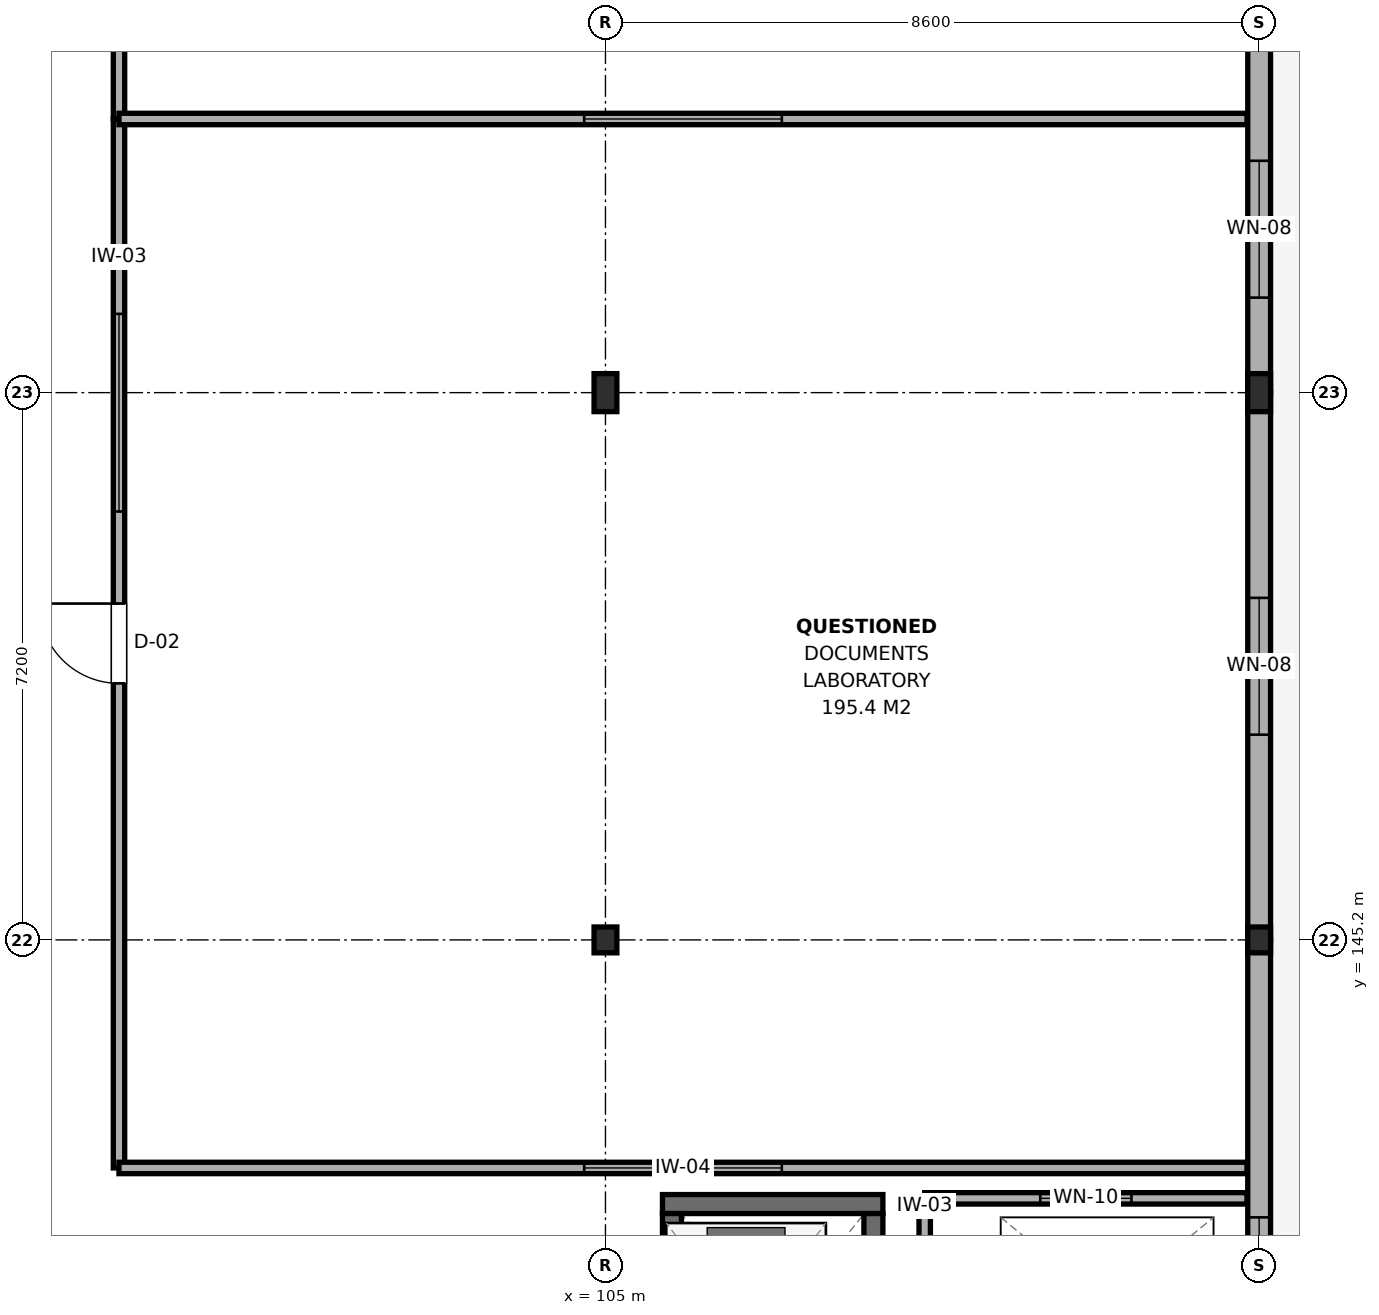
"""IFC4 building model, lengths in metres.
Left out: names, types, materials, properties, quantities, classifications, styles, units other than length and angle.
Written with IfcOpenShell. Run it as: python <this file> out.ifc"""

import sys

from ifc_helpers import new_model, si_unit, direction, frame, frame_2d, origin, origin_2d, place, context, subcontext, project, spatial, rectangle, i_section, extrude, element, fill, save


model = new_model("IFC4")
c1 = context("Model", 3, precision=1e-05, world=origin(), true_north=direction((0.0, 1.0)))
c2 = subcontext(c1, "Body", "Model", "MODEL_VIEW")
j1 = project(units=[si_unit("LENGTHUNIT", "METRE"), si_unit("PLANEANGLEUNIT", "RADIAN")], contexts=[c1])
p1 = place(None, origin())
s1 = spatial("IfcSite", under=j1, at=p1, CompositionType="ELEMENT")
p2 = place(p1, origin())
s2 = spatial("IfcBuilding", under=s1, at=p2, CompositionType="ELEMENT")
p3 = place(p2, frame((0.0, 0.0, 9.0)))
s3 = spatial("IfcBuildingStorey", under=s2, at=p3, CompositionType="ELEMENT", Elevation=9.0)
p4 = place(p3, frame((105.0, 145.2, 0.0), z_axis=(0.0, 0.0, 1.0), x_axis=(1.0, 0.0, 0.0)))
e1 = element("IfcColumn", 1, at=p4, inside=s3, PredefinedType="COLUMN", context=c2, shape_type="SweptSolid", body=[
    extrude(i_section(OverallWidth=0.3, OverallDepth=0.34, WebThickness=0.012, FlangeThickness=0.021, FilletRadius=0.027, at=origin_2d()), origin(), (0.0, 0.0, 1.0), 4.2),
])
p5 = place(p3, frame((105.0, 152.4, 0.0), z_axis=(0.0, 0.0, 1.0), x_axis=(1.0, 0.0, 0.0)))
e2 = element("IfcColumn", 2, at=p5, inside=s3, PredefinedType="COLUMN", context=c2, shape_type="SweptSolid", body=[
    extrude(i_section(OverallWidth=0.3, OverallDepth=0.5, WebThickness=0.014, FlangeThickness=0.028, FilletRadius=0.027, at=origin_2d()), origin(), (0.0, 0.0, 1.0), 4.2),
])
p6 = place(p3, frame((113.6, 145.2, 0.0), z_axis=(0.0, 0.0, 1.0), x_axis=(1.0, 0.0, 0.0)))
e3 = element("IfcColumn", 3, at=p6, inside=s3, PredefinedType="COLUMN", context=c2, shape_type="SweptSolid", body=[
    extrude(i_section(OverallWidth=0.3, OverallDepth=0.34, WebThickness=0.012, FlangeThickness=0.021, FilletRadius=0.027, at=origin_2d()), origin(), (0.0, 0.0, 1.0), 4.2),
])
p7 = place(p3, frame((113.6, 152.4, 0.0), z_axis=(0.0, 0.0, 1.0), x_axis=(1.0, 0.0, 0.0)))
e4 = element("IfcColumn", 4, at=p7, inside=s3, PredefinedType="COLUMN", context=c2, shape_type="SweptSolid", body=[
    extrude(i_section(OverallWidth=0.3, OverallDepth=0.5, WebThickness=0.014, FlangeThickness=0.028, FilletRadius=0.027, at=origin_2d()), origin(), (0.0, 0.0, 1.0), 4.2),
])
p8 = place(p3, frame((105.75, 141.725, 0.0), z_axis=(0.0, 0.0, 1.0), x_axis=(1.0, 0.0, 0.0)))
e5 = element("IfcWall", 5, at=p8, inside=s3, PredefinedType="SHEAR", context=c2, shape_type="SweptSolid", body=[
    extrude(rectangle(XDim=2.9, YDim=0.25, at=frame_2d((1.45, 0.0))), origin(), (0.0, 0.0, 1.0), 3.98),
])
p9 = place(p3, frame((105.875, 138.6, 0.0), z_axis=(0.0, 0.0, 1.0), x_axis=(0.0, 1.0, 0.0)))
e6 = element("IfcWall", 6, at=p9, inside=s3, PredefinedType="SHEAR", context=c2, shape_type="SweptSolid", body=[
    extrude(rectangle(XDim=3.0, YDim=0.25, at=frame_2d((1.5, 0.0))), origin(), (0.0, 0.0, 1.0), 3.98),
])
p10 = place(p9, frame((0.925, 0.0, 0.0)))
e7 = element("IfcOpeningElement", 7, at=p10, cuts=e6, PredefinedType="OPENING", context=c2, shape_type="SweptSolid", body=[
    extrude(rectangle(XDim=1.15, YDim=2.15, at=frame_2d((0.575, 1.075))), frame((0.0, 0.14, 0.0), z_axis=(0.0, -1.0, 0.0), x_axis=(1.0, 0.0, 0.0)), (0.0, 0.0, 1.0), 0.28),
])
p11 = place(p3, frame((108.525, 138.6, 0.0), z_axis=(0.0, 0.0, 1.0), x_axis=(0.0, 1.0, 0.0)))
e8 = element("IfcWall", 8, at=p11, inside=s3, PredefinedType="SHEAR", context=c2, shape_type="SweptSolid", body=[
    extrude(rectangle(XDim=3.0, YDim=0.25, at=frame_2d((1.5, 0.0))), origin(), (0.0, 0.0, 1.0), 3.98),
])
p12 = place(p3, frame((113.6, 138.0, 0.0), z_axis=(0.0, 0.0, 1.0), x_axis=(0.0, 1.0, 0.0)))
e9 = element("IfcWall", 9, at=p12, inside=s3, PredefinedType="SOLIDWALL", context=c2, shape_type="SweptSolid", body=[
    extrude(rectangle(XDim=7.2, YDim=0.3, at=frame_2d((3.6, 0.0))), origin(), (0.0, 0.0, 1.0), 3.375),
])
p13 = place(p12, frame((1.75, 0.0, 1.1)))
e10 = element("IfcOpeningElement", 10, at=p13, cuts=e9, PredefinedType="OPENING", context=c2, shape_type="SweptSolid", body=[
    extrude(rectangle(XDim=1.8, YDim=1.2, at=frame_2d((0.9, 0.6))), frame((0.0, 0.165, 0.0), z_axis=(0.0, -1.0, 0.0), x_axis=(1.0, 0.0, 0.0)), (0.0, 0.0, 1.0), 0.33),
])
p14 = place(p3, frame((113.6, 145.2, 0.0), z_axis=(0.0, 0.0, 1.0), x_axis=(0.0, 1.0, 0.0)))
e11 = element("IfcWall", 11, at=p14, inside=s3, PredefinedType="SOLIDWALL", context=c2, shape_type="SweptSolid", body=[
    extrude(rectangle(XDim=7.2, YDim=0.3, at=frame_2d((3.6, 0.0))), origin(), (0.0, 0.0, 1.0), 3.375),
])
p15 = place(p14, frame((2.7, 0.0, 1.1)))
e12 = element("IfcOpeningElement", 12, at=p15, cuts=e11, PredefinedType="OPENING", context=c2, shape_type="SweptSolid", body=[
    extrude(rectangle(XDim=1.8, YDim=1.2, at=frame_2d((0.9, 0.6))), frame((0.0, 0.165, 0.0), z_axis=(0.0, -1.0, 0.0), x_axis=(1.0, 0.0, 0.0)), (0.0, 0.0, 1.0), 0.33),
])
p16 = place(p3, frame((113.6, 152.4, 0.0), z_axis=(0.0, 0.0, 1.0), x_axis=(0.0, 1.0, 0.0)))
e13 = element("IfcWall", 13, at=p16, inside=s3, PredefinedType="SOLIDWALL", context=c2, shape_type="SweptSolid", body=[
    extrude(rectangle(XDim=7.2, YDim=0.3, at=frame_2d((3.6, 0.0))), origin(), (0.0, 0.0, 1.0), 3.375),
])
p17 = place(p16, frame((1.25, 0.0, 1.1)))
e14 = element("IfcOpeningElement", 14, at=p17, cuts=e13, PredefinedType="OPENING", context=c2, shape_type="SweptSolid", body=[
    extrude(rectangle(XDim=1.8, YDim=1.2, at=frame_2d((0.9, 0.6))), frame((0.0, 0.165, 0.0), z_axis=(0.0, -1.0, 0.0), x_axis=(1.0, 0.0, 0.0)), (0.0, 0.0, 1.0), 0.33),
])
p18 = place(p3, frame((109.2, 141.8, 0.0), z_axis=(0.0, 0.0, 1.0), x_axis=(1.0, 0.0, 0.0)))
e15 = element("IfcWall", 15, at=p18, inside=s3, PredefinedType="PARTITIONING", context=c2, shape_type="SweptSolid", body=[
    extrude(rectangle(XDim=4.24, YDim=0.15, at=frame_2d((2.12, 0.0))), origin(), (0.0, 0.0, 1.0), 3.645),
])
p19 = place(p18, frame((1.52, 0.0, 0.95)))
e16 = element("IfcOpeningElement", 16, at=p19, cuts=e15, PredefinedType="OPENING", context=c2, shape_type="SweptSolid", body=[
    extrude(rectangle(XDim=1.2, YDim=1.5, at=frame_2d((0.6, 0.75))), frame((0.0, 0.09, 0.0), z_axis=(0.0, -1.0, 0.0), x_axis=(1.0, 0.0, 0.0)), (0.0, 0.0, 1.0), 0.18),
])
p20 = place(p3, frame((109.2, 139.0, 0.0), z_axis=(0.0, 0.0, 1.0), x_axis=(0.0, 1.0, 0.0)))
e17 = element("IfcWall", 17, at=p20, inside=s3, PredefinedType="PARTITIONING", context=c2, shape_type="SweptSolid", body=[
    extrude(rectangle(XDim=2.8, YDim=0.15, at=frame_2d((1.4, 0.0))), origin(), (0.0, 0.0, 1.0), 3.975),
])
p21 = place(p20, frame((0.975, 0.0, 0.0)))
e18 = element("IfcOpeningElement", 18, at=p21, cuts=e17, PredefinedType="OPENING", context=c2, shape_type="SweptSolid", body=[
    extrude(rectangle(XDim=0.85, YDim=2.1, at=frame_2d((0.425, 1.05))), frame((0.0, 0.09, 0.0), z_axis=(0.0, -1.0, 0.0), x_axis=(1.0, 0.0, 0.0)), (0.0, 0.0, 1.0), 0.18),
])
p22 = place(p3, frame((98.6, 142.2, 0.0), z_axis=(0.0, 0.0, 1.0), x_axis=(0.0, 1.0, 0.0)))
e19 = element("IfcWall", 19, at=p22, inside=s3, PredefinedType="PARTITIONING", context=c2, shape_type="SweptSolid", body=[
    extrude(rectangle(XDim=13.8, YDim=0.15, at=frame_2d((6.9, 0.0))), origin(), (0.0, 0.0, 1.0), 3.435),
])
p23 = place(p22, frame((6.375, 0.0, 0.0)))
e20 = element("IfcOpeningElement", 20, at=p23, cuts=e19, PredefinedType="OPENING", context=c2, shape_type="SweptSolid", body=[
    extrude(rectangle(XDim=1.05, YDim=2.15, at=frame_2d((0.525, 1.075))), frame((0.0, 0.09, 0.0), z_axis=(0.0, -1.0, 0.0), x_axis=(1.0, 0.0, 0.0)), (0.0, 0.0, 1.0), 0.18),
])
p24 = place(p22, frame((8.636, 0.0, 0.95)))
e21 = element("IfcOpeningElement", 21, at=p24, cuts=e19, PredefinedType="OPENING", context=c2, shape_type="SweptSolid", body=[
    extrude(rectangle(XDim=2.6, YDim=1.5, at=frame_2d((1.3, 0.75))), frame((0.0, 0.09, 0.0), z_axis=(0.0, -1.0, 0.0), x_axis=(1.0, 0.0, 0.0)), (0.0, 0.0, 1.0), 0.18),
])
p25 = place(p3, frame((98.6, 142.2, 0.0), z_axis=(0.0, 0.0, 1.0), x_axis=(1.0, 0.0, 0.0)))
e22 = element("IfcWall", 22, at=p25, inside=s3, PredefinedType="PARTITIONING", context=c2, shape_type="SweptSolid", body=[
    extrude(rectangle(XDim=14.84, YDim=0.15, at=frame_2d((7.42, 0.0))), origin(), (0.0, 0.0, 1.0), 3.475),
])
p26 = place(p25, frame((6.12, 0.0, 0.95)))
e23 = element("IfcOpeningElement", 23, at=p26, cuts=e22, PredefinedType="OPENING", context=c2, shape_type="SweptSolid", body=[
    extrude(rectangle(XDim=2.6, YDim=1.5, at=frame_2d((1.3, 0.75))), frame((0.0, 0.09, 0.0), z_axis=(0.0, -1.0, 0.0), x_axis=(1.0, 0.0, 0.0)), (0.0, 0.0, 1.0), 0.18),
])
p27 = place(p3, frame((98.6, 156.0, 0.0), z_axis=(0.0, 0.0, 1.0), x_axis=(0.0, 1.0, 0.0)))
e24 = element("IfcWall", 24, at=p27, inside=s3, PredefinedType="PARTITIONING", context=c2, shape_type="SweptSolid", body=[
    extrude(rectangle(XDim=6.447, YDim=0.15, at=frame_2d((3.224, 0.0))), origin(), (0.0, 0.0, 1.0), 3.625),
])
p28 = place(p27, frame((2.749, 0.0, 0.0)))
e25 = element("IfcOpeningElement", 25, at=p28, cuts=e24, PredefinedType="OPENING", context=c2, shape_type="SweptSolid", body=[
    extrude(rectangle(XDim=0.95, YDim=2.15, at=frame_2d((0.475, 1.075))), frame((0.0, 0.09, 0.0), z_axis=(0.0, -1.0, 0.0), x_axis=(1.0, 0.0, 0.0)), (0.0, 0.0, 1.0), 0.18),
])
p29 = place(p3, frame((98.6, 156.0, 0.0), z_axis=(0.0, 0.0, 1.0), x_axis=(1.0, 0.0, 0.0)))
e26 = element("IfcWall", 26, at=p29, inside=s3, PredefinedType="PARTITIONING", context=c2, shape_type="SweptSolid", body=[
    extrude(rectangle(XDim=14.84, YDim=0.15, at=frame_2d((7.42, 0.0))), origin(), (0.0, 0.0, 1.0), 3.425),
])
p30 = place(p29, frame((6.12, 0.0, 0.95)))
e27 = element("IfcOpeningElement", 27, at=p30, cuts=e26, PredefinedType="OPENING", context=c2, shape_type="SweptSolid", body=[
    extrude(rectangle(XDim=2.6, YDim=1.5, at=frame_2d((1.3, 0.75))), frame((0.0, 0.09, 0.0), z_axis=(0.0, -1.0, 0.0), x_axis=(1.0, 0.0, 0.0)), (0.0, 0.0, 1.0), 0.18),
])
p31 = place(p13, origin())
e28 = element("IfcWindow", 28, at=p31, inside=s3, PartitioningType="SINGLE_PANEL", PredefinedType="WINDOW", context=c2, shape_type="SweptSolid", body=[
    extrude(rectangle(XDim=1.8, YDim=1.2, at=frame_2d((0.9, 0.6))), frame((0.0, 0.03, 0.0), z_axis=(0.0, -1.0, 0.0), x_axis=(1.0, 0.0, 0.0)), (0.0, 0.0, 1.0), 0.06),
])
fill(e10, e28)
p32 = place(p15, origin())
e29 = element("IfcWindow", 29, at=p32, inside=s3, PartitioningType="SINGLE_PANEL", PredefinedType="WINDOW", context=c2, shape_type="SweptSolid", body=[
    extrude(rectangle(XDim=1.8, YDim=1.2, at=frame_2d((0.9, 0.6))), frame((0.0, 0.03, 0.0), z_axis=(0.0, -1.0, 0.0), x_axis=(1.0, 0.0, 0.0)), (0.0, 0.0, 1.0), 0.06),
])
fill(e12, e29)
p33 = place(p17, origin())
e30 = element("IfcWindow", 30, at=p33, inside=s3, PartitioningType="SINGLE_PANEL", PredefinedType="WINDOW", context=c2, shape_type="SweptSolid", body=[
    extrude(rectangle(XDim=1.8, YDim=1.2, at=frame_2d((0.9, 0.6))), frame((0.0, 0.03, 0.0), z_axis=(0.0, -1.0, 0.0), x_axis=(1.0, 0.0, 0.0)), (0.0, 0.0, 1.0), 0.06),
])
fill(e14, e30)
p34 = place(p19, origin())
e31 = element("IfcWindow", 31, at=p34, inside=s3, PartitioningType="SINGLE_PANEL", PredefinedType="WINDOW", context=c2, shape_type="SweptSolid", body=[
    extrude(rectangle(XDim=1.2, YDim=1.5, at=frame_2d((0.6, 0.75))), frame((0.0, 0.03, 0.0), z_axis=(0.0, -1.0, 0.0), x_axis=(1.0, 0.0, 0.0)), (0.0, 0.0, 1.0), 0.06),
])
fill(e16, e31)
p35 = place(p23, origin())
e32 = element("IfcDoor", 32, at=p35, inside=s3, OperationType="SINGLE_SWING_RIGHT", PredefinedType="DOOR", context=c2, shape_type="SweptSolid", body=[
    extrude(rectangle(XDim=1.05, YDim=2.15, at=frame_2d((0.525, 1.075))), frame((0.0, 0.025, 0.0), z_axis=(0.0, -1.0, 0.0), x_axis=(1.0, 0.0, 0.0)), (0.0, 0.0, 1.0), 0.05),
])
fill(e20, e32)
p36 = place(p24, origin())
e33 = element("IfcWindow", 33, at=p36, inside=s3, PartitioningType="SINGLE_PANEL", PredefinedType="WINDOW", context=c2, shape_type="SweptSolid", body=[
    extrude(rectangle(XDim=2.6, YDim=1.5, at=frame_2d((1.3, 0.75))), frame((0.0, 0.03, 0.0), z_axis=(0.0, -1.0, 0.0), x_axis=(1.0, 0.0, 0.0)), (0.0, 0.0, 1.0), 0.06),
])
fill(e21, e33)
p37 = place(p26, origin())
e34 = element("IfcWindow", 34, at=p37, inside=s3, PartitioningType="SINGLE_PANEL", PredefinedType="WINDOW", context=c2, shape_type="SweptSolid", body=[
    extrude(rectangle(XDim=2.6, YDim=1.5, at=frame_2d((1.3, 0.75))), frame((0.0, 0.03, 0.0), z_axis=(0.0, -1.0, 0.0), x_axis=(1.0, 0.0, 0.0)), (0.0, 0.0, 1.0), 0.06),
])
fill(e23, e34)
p38 = place(p30, origin())
e35 = element("IfcWindow", 35, at=p38, inside=s3, PartitioningType="SINGLE_PANEL", PredefinedType="WINDOW", context=c2, shape_type="SweptSolid", body=[
    extrude(rectangle(XDim=2.6, YDim=1.5, at=frame_2d((1.3, 0.75))), frame((0.0, 0.03, 0.0), z_axis=(0.0, -1.0, 0.0), x_axis=(1.0, 0.0, 0.0)), (0.0, 0.0, 1.0), 0.06),
])
fill(e27, e35)
save(model, sys.argv[1])
